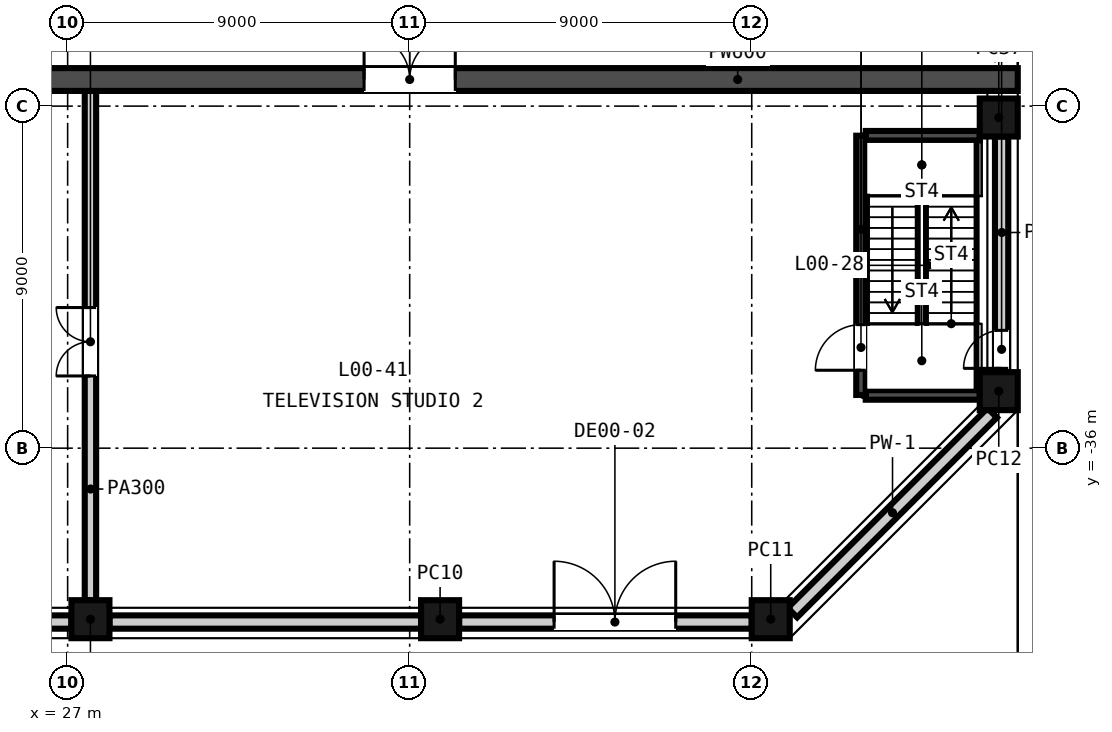
"""IFC4 building model, lengths in metres.
Left out: names, types, materials, properties, quantities, classifications, styles, units other than length and angle.
Written with IfcOpenShell. Run it as: python <this file> out.ifc"""

import sys

from ifc_helpers import new_model, si_unit, direction, frame, frame_2d, origin, origin_2d, place, context, subcontext, project, spatial, rectangle, extrude, element, fill, save


model = new_model("IFC4")
c1 = context("Model", 3, precision=1e-05, world=origin(), true_north=direction((0.0, 1.0)))
c2 = subcontext(c1, "Body", "Model", "MODEL_VIEW")
j1 = project(units=[si_unit("LENGTHUNIT", "METRE"), si_unit("PLANEANGLEUNIT", "RADIAN")], contexts=[c1])
p1 = place(None, origin())
s1 = spatial("IfcSite", under=j1, at=p1, CompositionType="ELEMENT")
p2 = place(p1, origin())
s2 = spatial("IfcBuilding", under=s1, at=p2, CompositionType="ELEMENT")
p3 = place(p2, origin())
s3 = spatial("IfcBuildingStorey", under=s2, at=p3, CompositionType="ELEMENT", Elevation=0.0)
for number, where, z_axis, x_axis in (
    (1, (27.6, -40.5, -0.3), (0.0, 0.0, 1.0), (1.0, 0.0, 0.0)),
    (2, (36.8, -40.5, -0.3), (0.0, 0.0, 1.0), (1.0, 0.0, 0.0)),
    (3, (45.5, -40.5, -0.3), (0.0, 0.0, 1.0), (1.0, 0.0, 0.0)),
    (4, (51.5, -34.5, -0.3), (0.0, 0.0, 1.0), (0.0, 1.0, 0.0)),
    (5, (51.5, -27.3, -0.3), (0.0, 0.0, 1.0), (0.0, 1.0, 0.0)),
):
    element("IfcColumn", number, at=place(p3, frame(where, z_axis=z_axis, x_axis=x_axis)), inside=s3, PredefinedType="COLUMN", context=c2, shape_type="SweptSolid", body=[
        extrude(rectangle(XDim=1.0, YDim=1.0, at=origin_2d()), origin(), (0.0, 0.0, 1.0), 8.9),
    ])
p4 = place(p3, frame((-19.861, -26.3, -0.3), z_axis=(0.0, 0.0, 1.0), x_axis=(1.0, 0.0, 0.0)))
e6 = element("IfcWall", 6, at=p4, inside=s3, PredefinedType="SOLIDWALL", context=c2, shape_type="SweptSolid", body=[
    extrude(rectangle(XDim=71.861, YDim=0.6, at=frame_2d((35.93, 0.0))), origin(), (0.0, 0.0, 1.0), 8.9),
])
p5 = place(p4, frame((54.661, 0.0, 0.3)))
e7 = element("IfcOpeningElement", 7, at=p5, cuts=e6, PredefinedType="OPENING", context=c2, shape_type="SweptSolid", body=[
    extrude(rectangle(XDim=2.4, YDim=2.4, at=frame_2d((1.2, 1.2))), frame((0.0, 0.31, 0.0), z_axis=(0.0, -1.0, 0.0), x_axis=(1.0, 0.0, 0.0)), (0.0, 0.0, 1.0), 0.62),
])
p6 = place(p4, frame((8.589, 0.0, 0.3)))
e8 = element("IfcOpeningElement", 8, at=p6, cuts=e6, PredefinedType="OPENING", context=c2, shape_type="SweptSolid", body=[
    extrude(rectangle(XDim=1.8, YDim=2.4, at=frame_2d((0.9, 1.2))), frame((0.0, 0.31, 0.0), z_axis=(0.0, -1.0, 0.0), x_axis=(1.0, 0.0, 0.0)), (0.0, 0.0, 1.0), 0.62),
])
p7 = place(p4, frame((16.551, 0.0, 0.3)))
e9 = element("IfcOpeningElement", 9, at=p7, cuts=e6, PredefinedType="OPENING", context=c2, shape_type="SweptSolid", body=[
    extrude(rectangle(XDim=1.8, YDim=2.4, at=frame_2d((0.9, 1.2))), frame((0.0, 0.31, 0.0), z_axis=(0.0, -1.0, 0.0), x_axis=(1.0, 0.0, 0.0)), (0.0, 0.0, 1.0), 0.62),
])
p8 = place(p4, frame((24.952, 0.0, 0.3)))
e10 = element("IfcOpeningElement", 10, at=p8, cuts=e6, PredefinedType="OPENING", context=c2, shape_type="SweptSolid", body=[
    extrude(rectangle(XDim=1.8, YDim=2.4, at=frame_2d((0.9, 1.2))), frame((0.0, 0.31, 0.0), z_axis=(0.0, -1.0, 0.0), x_axis=(1.0, 0.0, 0.0)), (0.0, 0.0, 1.0), 0.62),
])
p9 = place(p4, frame((32.914, 0.0, 0.3)))
e11 = element("IfcOpeningElement", 11, at=p9, cuts=e6, PredefinedType="OPENING", context=c2, shape_type="SweptSolid", body=[
    extrude(rectangle(XDim=1.8, YDim=2.4, at=frame_2d((0.9, 1.2))), frame((0.0, 0.31, 0.0), z_axis=(0.0, -1.0, 0.0), x_axis=(1.0, 0.0, 0.0)), (0.0, 0.0, 1.0), 0.62),
])
p10 = place(p4, frame((43.661, 0.0, 0.3)))
e12 = element("IfcOpeningElement", 12, at=p10, cuts=e6, PredefinedType="OPENING", context=c2, shape_type="SweptSolid", body=[
    extrude(rectangle(XDim=2.4, YDim=2.4, at=frame_2d((1.2, 1.2))), frame((0.0, 0.31, 0.0), z_axis=(0.0, -1.0, 0.0), x_axis=(1.0, 0.0, 0.0)), (0.0, 0.0, 1.0), 0.62),
])
p11 = place(p3, frame((18.9, -40.575, -0.3), z_axis=(0.0, 0.0, 1.0), x_axis=(1.0, 0.0, 0.0)))
e13 = element("IfcWall", 13, at=p11, inside=s3, PredefinedType="SOLIDWALL", context=c2, shape_type="SweptSolid", body=[
    extrude(rectangle(XDim=8.2, YDim=0.35, at=frame_2d((4.1, 0.0))), origin(), (0.0, 0.0, 1.0), 8.0),
])
p12 = place(p11, frame((2.5, 0.0, 0.3)))
e14 = element("IfcOpeningElement", 14, at=p12, cuts=e13, PredefinedType="OPENING", context=c2, shape_type="SweptSolid", body=[
    extrude(rectangle(XDim=3.2, YDim=4.0, at=frame_2d((1.6, 2.0))), frame((0.0, 0.185, 0.0), z_axis=(0.0, -1.0, 0.0), x_axis=(1.0, 0.0, 0.0)), (0.0, 0.0, 1.0), 0.37),
])
p13 = place(p3, frame((28.1, -40.575, -0.3), z_axis=(0.0, 0.0, 1.0), x_axis=(1.0, 0.0, 0.0)))
e15 = element("IfcWall", 15, at=p13, inside=s3, PredefinedType="SOLIDWALL", context=c2, shape_type="SweptSolid", body=[
    extrude(rectangle(XDim=8.2, YDim=0.35, at=frame_2d((4.1, 0.0))), origin(), (0.0, 0.0, 1.0), 8.0),
])
p14 = place(p3, frame((37.3, -40.575, -0.3), z_axis=(0.0, 0.0, 1.0), x_axis=(1.0, 0.0, 0.0)))
e16 = element("IfcWall", 16, at=p14, inside=s3, PredefinedType="SOLIDWALL", context=c2, shape_type="SweptSolid", body=[
    extrude(rectangle(XDim=7.7, YDim=0.35, at=frame_2d((3.85, 0.0))), origin(), (0.0, 0.0, 1.0), 8.0),
])
p15 = place(p14, frame((2.5, 0.0, 0.3)))
e17 = element("IfcOpeningElement", 17, at=p15, cuts=e16, PredefinedType="OPENING", context=c2, shape_type="SweptSolid", body=[
    extrude(rectangle(XDim=3.2, YDim=4.0, at=frame_2d((1.6, 2.0))), frame((0.0, 0.185, 0.0), z_axis=(0.0, -1.0, 0.0), x_axis=(1.0, 0.0, 0.0)), (0.0, 0.0, 1.0), 0.37),
])
p16 = place(p3, frame((46.072, -40.327, -0.3), z_axis=(0.0, 0.0, 1.0), x_axis=(0.707106781187, 0.707106781187, 0.0)))
e18 = element("IfcWall", 18, at=p16, inside=s3, PredefinedType="SOLIDWALL", context=c2, shape_type="SweptSolid", body=[
    extrude(rectangle(XDim=7.433, YDim=0.35, at=frame_2d((3.716, 0.0))), origin(), (0.0, 0.0, 1.0), 8.0),
])
p17 = place(p3, frame((51.575, -34.0, -0.3), z_axis=(0.0, 0.0, 1.0), x_axis=(0.0, 1.0, 0.0)))
e19 = element("IfcWall", 19, at=p17, inside=s3, PredefinedType="SOLIDWALL", context=c2, shape_type="SweptSolid", body=[
    extrude(rectangle(XDim=6.2, YDim=0.35, at=frame_2d((3.1, 0.0))), origin(), (0.0, 0.0, 1.0), 8.0),
])
p18 = place(p17, frame((0.1, 0.0, 0.3)))
e20 = element("IfcOpeningElement", 20, at=p18, cuts=e19, PredefinedType="OPENING", context=c2, shape_type="SweptSolid", body=[
    extrude(rectangle(XDim=1.0, YDim=2.4, at=frame_2d((0.5, 1.2))), frame((0.0, 0.185, 0.0), z_axis=(0.0, -1.0, 0.0), x_axis=(1.0, 0.0, 0.0)), (0.0, 0.0, 1.0), 0.37),
])
for number, where, z_axis, x_axis in (
    (21, (48.0, -34.6, 0.0), (0.0, 0.0, 1.0), (1.0, 0.0, 0.0)),
    (22, (48.0, -27.779, 0.0), (0.0, 0.0, 1.0), (1.0, 0.0, 0.0)),
):
    element("IfcWall", number, at=place(p3, frame(where, z_axis=z_axis, x_axis=x_axis)), inside=s3, PredefinedType="SHEAR", context=c2, shape_type="SweptSolid", body=[
        extrude(rectangle(XDim=3.0, YDim=0.25, at=frame_2d((1.5, 0.0))), origin(), (0.0, 0.0, 1.0), 8.6),
    ])
p19 = place(p3, frame((27.6, -40.0, 0.0), z_axis=(0.0, 0.0, 1.0), x_axis=(0.0, 1.0, 0.0)))
e23 = element("IfcWall", 23, at=p19, inside=s3, PredefinedType="PARTITIONING", context=c2, shape_type="SweptSolid", body=[
    extrude(rectangle(XDim=13.4, YDim=0.3, at=frame_2d((6.7, 0.0))), origin(), (0.0, 0.0, 1.0), 8.6),
])
p20 = place(p19, frame((5.9, 0.0, 0.0)))
e24 = element("IfcOpeningElement", 24, at=p20, cuts=e23, PredefinedType="OPENING", context=c2, shape_type="SweptSolid", body=[
    extrude(rectangle(XDim=1.8, YDim=2.4, at=frame_2d((0.9, 1.2))), frame((0.0, 0.16, 0.0), z_axis=(0.0, -1.0, 0.0), x_axis=(1.0, 0.0, 0.0)), (0.0, 0.0, 1.0), 0.32),
])
p21 = place(p3, frame((47.875, -34.6, 0.0), z_axis=(0.0, 0.0, 1.0), x_axis=(0.0, 1.0, 0.0)))
e25 = element("IfcWall", 25, at=p21, inside=s3, PredefinedType="SHEAR", context=c2, shape_type="SweptSolid", body=[
    extrude(rectangle(XDim=6.821, YDim=0.25, at=frame_2d((3.411, 0.0))), origin(), (0.0, 0.0, 1.0), 8.6),
])
p22 = place(p21, frame((0.65, 0.0, 0.0)))
e26 = element("IfcOpeningElement", 26, at=p22, cuts=e25, PredefinedType="OPENING", context=c2, shape_type="SweptSolid", body=[
    extrude(rectangle(XDim=1.2, YDim=2.1, at=frame_2d((0.6, 1.05))), frame((0.0, 0.135, 0.0), z_axis=(0.0, -1.0, 0.0), x_axis=(1.0, 0.0, 0.0)), (0.0, 0.0, 1.0), 0.27),
])
p23 = place(p15, origin())
e27 = element("IfcDoor", 27, at=p23, inside=s3, OperationType="DOUBLE_DOOR_SINGLE_SWING", PredefinedType="DOOR", context=c2, shape_type="SweptSolid", body=[
    extrude(rectangle(XDim=3.2, YDim=4.0, at=frame_2d((1.6, 2.0))), frame((0.0, 0.025, 0.0), z_axis=(0.0, -1.0, 0.0), x_axis=(1.0, 0.0, 0.0)), (0.0, 0.0, 1.0), 0.05),
])
fill(e17, e27)
p24 = place(p18, frame((1.0, 0.0, 0.0), z_axis=(0.0, 0.0, 1.0), x_axis=(-1.0, 0.0, 0.0)))
e28 = element("IfcDoor", 28, at=p24, inside=s3, OperationType="SINGLE_SWING_LEFT", PredefinedType="DOOR", context=c2, shape_type="SweptSolid", body=[
    extrude(rectangle(XDim=1.0, YDim=2.4, at=frame_2d((0.5, 1.2))), frame((0.0, 0.025, 0.0), z_axis=(0.0, -1.0, 0.0), x_axis=(1.0, 0.0, 0.0)), (0.0, 0.0, 1.0), 0.05),
])
fill(e20, e28)
p25 = place(p22, origin())
e29 = element("IfcDoor", 29, at=p25, inside=s3, OperationType="SINGLE_SWING_LEFT", PredefinedType="DOOR", context=c2, shape_type="SweptSolid", body=[
    extrude(rectangle(XDim=1.2, YDim=2.1, at=frame_2d((0.6, 1.05))), frame((0.0, 0.025, 0.0), z_axis=(0.0, -1.0, 0.0), x_axis=(1.0, 0.0, 0.0)), (0.0, 0.0, 1.0), 0.05),
])
fill(e26, e29)
p26 = place(p20, origin())
e30 = element("IfcDoor", 30, at=p26, inside=s3, OperationType="SINGLE_SWING_LEFT", PredefinedType="DOOR", context=c2, shape_type="SweptSolid", body=[
    extrude(rectangle(XDim=1.8, YDim=2.4, at=frame_2d((0.9, 1.2))), frame((0.0, 0.025, 0.0), z_axis=(0.0, -1.0, 0.0), x_axis=(1.0, 0.0, 0.0)), (0.0, 0.0, 1.0), 0.05),
])
fill(e24, e30)
p27 = place(p5, origin())
e31 = element("IfcDoor", 31, at=p27, inside=s3, OperationType="SINGLE_SWING_LEFT", PredefinedType="DOOR", context=c2, shape_type="SweptSolid", body=[
    extrude(rectangle(XDim=2.4, YDim=2.4, at=frame_2d((1.2, 1.2))), frame((0.0, 0.025, 0.0), z_axis=(0.0, -1.0, 0.0), x_axis=(1.0, 0.0, 0.0)), (0.0, 0.0, 1.0), 0.05),
])
fill(e7, e31)
save(model, sys.argv[1])
